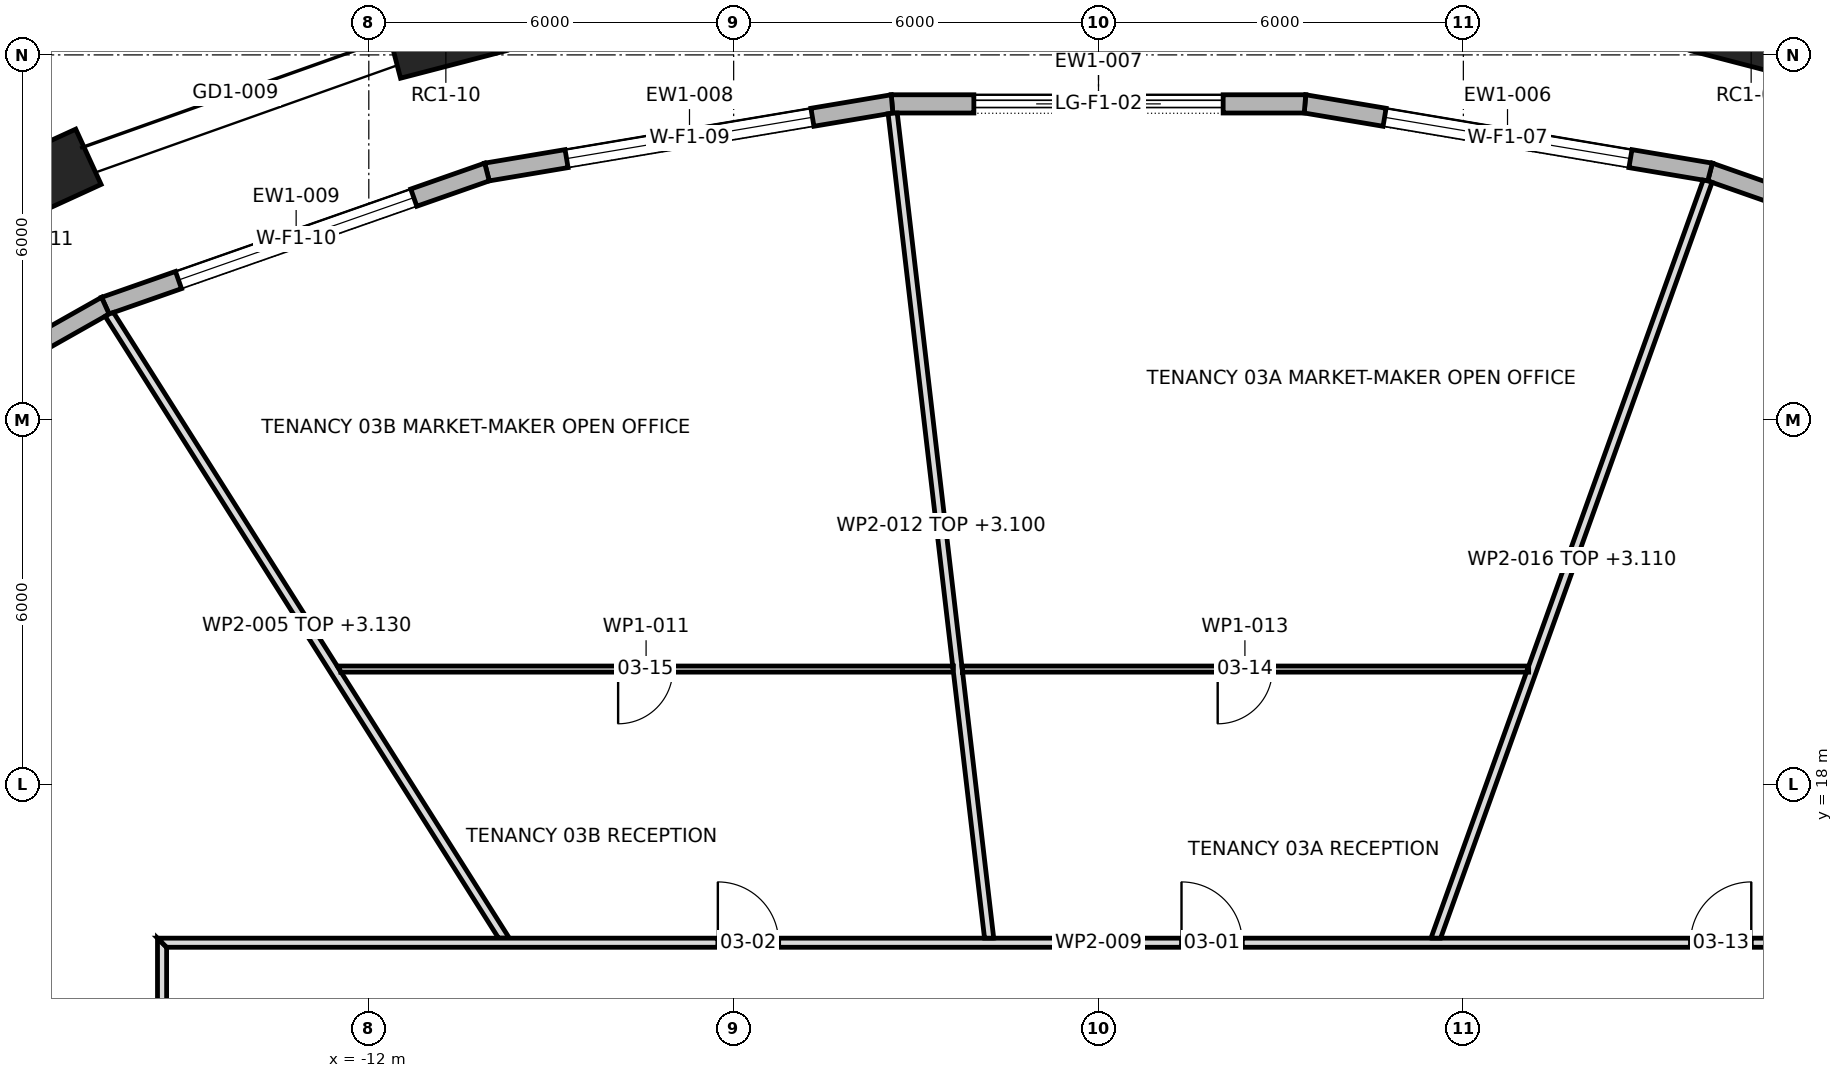
"""IFC4 building model, lengths in metres.
Left out: names, types, materials, properties, quantities, classifications, styles, units other than length and angle.
Written with IfcOpenShell. Run it as: python <this file> out.ifc"""

import sys

from ifc_helpers import new_model, si_unit, direction, frame, frame_2d, origin, origin_2d, place, context, subcontext, project, spatial, polyline, rectangle, outline, extrude, element, fill, save


model = new_model("IFC4")
c1 = context("Model", 3, precision=1e-05, world=origin(), true_north=direction((0.0, 1.0)))
c2 = subcontext(c1, "Body", "Model", "MODEL_VIEW")
j1 = project(units=[si_unit("LENGTHUNIT", "METRE"), si_unit("PLANEANGLEUNIT", "RADIAN")], contexts=[c1])
p1 = place(None, origin())
s1 = spatial("IfcSite", under=j1, at=p1, CompositionType="ELEMENT")
p2 = place(p1, origin())
s2 = spatial("IfcBuilding", under=s1, at=p2, CompositionType="ELEMENT")
p3 = place(p2, frame((0.0, 0.0, 57.1)))
s3 = spatial("IfcBuildingStorey", under=s2, at=p3, CompositionType="ELEMENT", Elevation=57.1)
for number, where, z_axis, x_axis in (
    (1, (10.733, 30.327, 0.0), (0.0, 0.0, 1.0), (-0.968, 0.252, 0.0)),
    (2, (-10.733, 30.327, 0.0), (0.0, 0.0, 1.0), (-0.968, -0.252, 0.0)),
    (3, (-17.429, 27.95, 0.0), (0.0, 0.0, 1.0), (-0.909, -0.417, 0.0)),
):
    element("IfcColumn", number, at=place(p3, frame(where, z_axis=z_axis, x_axis=x_axis)), inside=s3, PredefinedType="COLUMN", context=c2, shape_type="SweptSolid", body=[
        extrude(rectangle(XDim=1.8, YDim=1.0, at=origin_2d()), origin(), (0.0, 0.0, 1.0), 4.2),
    ])
p4 = place(p3, frame((16.333, 25.876, 0.0), z_axis=(0.0, 0.0, 1.0), x_axis=(-0.943790794479, 0.330543395421, 0.0)))
e4 = element("IfcWall", 4, at=p4, inside=s3, PredefinedType="STANDARD", context=c2, shape_type="SweptSolid", body=[
    extrude(outline(polyline([(-0.013, -0.15), (6.662, -0.15), (6.637, 0.15), (0.013, 0.15), (-0.013, -0.15)])), origin(), (0.0, 0.0, 1.0), 3.9),
])
p5 = place(p4, frame((1.275, 0.0, 0.6)))
e5 = element("IfcOpeningElement", 5, at=p5, cuts=e4, PredefinedType="OPENING", context=c2, shape_type="SweptSolid", body=[
    extrude(rectangle(XDim=4.1, YDim=2.85, at=frame_2d((2.05, 1.425))), frame((0.0, 0.162, 0.0), z_axis=(0.0, -1.0, 0.0), x_axis=(1.0, 0.0, 0.0)), (0.0, 0.0, 1.0), 0.324),
])
p6 = place(p3, frame((10.057, 28.074, 0.0), z_axis=(0.0, 0.0, 1.0), x_axis=(-0.986149614624, 0.165858185139, 0.0)))
e6 = element("IfcWall", 6, at=p6, inside=s3, PredefinedType="STANDARD", context=c2, shape_type="SweptSolid", body=[
    extrude(outline(polyline([(-0.013, -0.15), (6.767, -0.15), (6.742, 0.15), (0.013, 0.15), (-0.013, -0.15)])), origin(), (0.0, 0.0, 1.0), 3.9),
])
p7 = place(p6, frame((1.327, 0.0, 0.6)))
e7 = element("IfcOpeningElement", 7, at=p7, cuts=e6, PredefinedType="OPENING", context=c2, shape_type="SweptSolid", body=[
    extrude(rectangle(XDim=4.1, YDim=2.85, at=frame_2d((2.05, 1.425))), frame((0.0, 0.162, 0.0), z_axis=(0.0, -1.0, 0.0), x_axis=(1.0, 0.0, 0.0)), (0.0, 0.0, 1.0), 0.324),
])
p8 = place(p3, frame((3.396, 29.195, 0.0), z_axis=(0.0, 0.0, 1.0), x_axis=(-1.0, 0.0, 0.0)))
e8 = element("IfcWall", 8, at=p8, inside=s3, PredefinedType="STANDARD", context=c2, shape_type="SweptSolid", body=[
    extrude(outline(polyline([(-0.012, -0.15), (6.803, -0.15), (6.779, 0.15), (0.012, 0.15), (-0.012, -0.15)])), origin(), (0.0, 0.0, 1.0), 3.9),
])
p9 = place(p8, frame((1.346, 0.0, 0.0)))
e9 = element("IfcOpeningElement", 9, at=p9, cuts=e8, PredefinedType="OPENING", context=c2, shape_type="SweptSolid", body=[
    extrude(rectangle(XDim=4.1, YDim=3.45, at=frame_2d((2.05, 1.725))), frame((0.0, 0.162, 0.0), z_axis=(0.0, -1.0, 0.0), x_axis=(1.0, 0.0, 0.0)), (0.0, 0.0, 1.0), 0.324),
])
p10 = place(p3, frame((-3.396, 29.195, 0.0), z_axis=(0.0, 0.0, 1.0), x_axis=(-0.986149614624, -0.165858185139, 0.0)))
e10 = element("IfcWall", 10, at=p10, inside=s3, PredefinedType="STANDARD", context=c2, shape_type="SweptSolid", body=[
    extrude(outline(polyline([(-0.012, -0.15), (6.768, -0.15), (6.742, 0.15), (0.012, 0.15), (-0.012, -0.15)])), origin(), (0.0, 0.0, 1.0), 3.9),
])
p11 = place(p10, frame((1.327, 0.0, 0.6)))
e11 = element("IfcOpeningElement", 11, at=p11, cuts=e10, PredefinedType="OPENING", context=c2, shape_type="SweptSolid", body=[
    extrude(rectangle(XDim=4.1, YDim=2.85, at=frame_2d((2.05, 1.425))), frame((0.0, 0.162, 0.0), z_axis=(0.0, -1.0, 0.0), x_axis=(1.0, 0.0, 0.0)), (0.0, 0.0, 1.0), 0.324),
])
p12 = place(p3, frame((-10.057, 28.074, 0.0), z_axis=(0.0, 0.0, 1.0), x_axis=(-0.943790794479, -0.330543395421, 0.0)))
e12 = element("IfcWall", 12, at=p12, inside=s3, PredefinedType="STANDARD", context=c2, shape_type="SweptSolid", body=[
    extrude(outline(polyline([(-0.013, -0.15), (6.663, -0.15), (6.636, 0.15), (0.013, 0.15), (-0.013, -0.15)])), origin(), (0.0, 0.0, 1.0), 3.9),
])
p13 = place(p12, frame((1.275, 0.0, 0.6)))
e13 = element("IfcOpeningElement", 13, at=p13, cuts=e12, PredefinedType="OPENING", context=c2, shape_type="SweptSolid", body=[
    extrude(rectangle(XDim=4.1, YDim=2.85, at=frame_2d((2.05, 1.425))), frame((0.0, 0.162, 0.0), z_axis=(0.0, -1.0, 0.0), x_axis=(1.0, 0.0, 0.0)), (0.0, 0.0, 1.0), 0.324),
])
p14 = place(p3, frame((-16.333, 25.876, 0.0), z_axis=(0.0, 0.0, 1.0), x_axis=(-0.870647609977, -0.491907246584, 0.0)))
e14 = element("IfcWall", 14, at=p14, inside=s3, PredefinedType="STANDARD", context=c2, shape_type="SweptSolid", body=[
    extrude(outline(polyline([(-0.013, -0.15), (6.503, -0.15), (6.475, 0.15), (0.013, 0.15), (-0.013, -0.15)])), origin(), (0.0, 0.0, 1.0), 3.9),
])
p15 = place(p14, frame((1.195, 0.0, 0.6)))
e15 = element("IfcOpeningElement", 15, at=p15, cuts=e14, PredefinedType="OPENING", context=c2, shape_type="SweptSolid", body=[
    extrude(rectangle(XDim=4.1, YDim=2.85, at=frame_2d((2.05, 1.425))), frame((0.0, 0.162, 0.0), z_axis=(0.0, -1.0, 0.0), x_axis=(1.0, 0.0, 0.0)), (0.0, 0.0, 1.0), 0.324),
])
p16 = place(p3, frame((-16.273, 25.742, 0.0), z_axis=(0.0, 0.0, 1.0), x_axis=(0.534654841392, -0.845070529942, 0.0)))
e16 = element("IfcWall", 16, at=p16, inside=s3, PredefinedType="PARTITIONING", context=c2, shape_type="SweptSolid", body=[
    extrude(outline(polyline([(0.0, -0.075), (1.729, -0.075), (3.458, -0.075), (5.186, -0.075), (6.915, -0.075), (8.644, -0.075), (10.373, -0.075), (12.102, -0.075), (12.196, 0.075), (12.196, 0.075), (10.471, 0.075), (8.745, 0.075), (7.019, 0.075), (7.018, 0.072), (7.013, 0.075), (5.265, 0.075), (3.517, 0.075), (1.769, 0.075), (0.021, 0.075), (0.004, 0.0), (0.0, -0.071), (0.0, -0.075)])), origin(), (0.0, 0.0, 1.0), 3.13),
])
p17 = place(p3, frame((-15.4, -15.475, 0.0), z_axis=(0.0, 0.0, 1.0), x_axis=(0.0, 1.0, 0.0)))
e17 = element("IfcWall", 17, at=p17, inside=s3, PredefinedType="PARTITIONING", context=c2, shape_type="SweptSolid", body=[
    extrude(outline(polyline([(0.15, -0.075), (2.066, -0.075), (3.981, -0.075), (5.897, -0.075), (7.812, -0.075), (9.728, -0.075), (11.644, -0.075), (13.56, -0.075), (15.475, -0.075), (17.391, -0.075), (19.306, -0.075), (21.222, -0.075), (23.138, -0.075), (25.053, -0.075), (26.969, -0.075), (28.885, -0.075), (30.8, -0.075), (30.95, 0.075), (29.016, 0.075), (27.081, 0.075), (25.147, 0.075), (23.212, 0.075), (21.278, 0.075), (19.344, 0.075), (17.409, 0.075), (15.475, 0.075), (13.541, 0.075), (11.606, 0.075), (9.672, 0.075), (7.738, 0.075), (5.803, 0.075), (3.869, 0.075), (1.935, 0.075), (0.0, 0.075), (0.15, -0.075)])), origin(), (0.0, 0.0, 1.0), 3.9),
])
p18 = place(p17, frame((25.755, 0.0, 0.0)))
e18 = element("IfcOpeningElement", 18, at=p18, cuts=e17, PredefinedType="OPENING", context=c2, shape_type="SweptSolid", body=[
    extrude(rectangle(XDim=1.8, YDim=2.1, at=frame_2d((0.9, 1.05))), frame((0.0, 0.087, 0.0), z_axis=(0.0, -1.0, 0.0), x_axis=(1.0, 0.0, 0.0)), (0.0, 0.0, 1.0), 0.174),
])
p19 = place(p17, frame((18.695, 0.0, 0.0)))
e19 = element("IfcOpeningElement", 19, at=p19, cuts=e17, PredefinedType="OPENING", context=c2, shape_type="SweptSolid", body=[
    extrude(rectangle(XDim=1.8, YDim=2.1, at=frame_2d((0.9, 1.05))), frame((0.0, 0.087, 0.0), z_axis=(0.0, -1.0, 0.0), x_axis=(1.0, 0.0, 0.0)), (0.0, 0.0, 1.0), 0.174),
])
p20 = place(p17, frame((12.135, 0.0, 0.0)))
e20 = element("IfcOpeningElement", 20, at=p20, cuts=e17, PredefinedType="OPENING", context=c2, shape_type="SweptSolid", body=[
    extrude(rectangle(XDim=1.0, YDim=2.1, at=frame_2d((0.5, 1.05))), frame((0.0, 0.087, 0.0), z_axis=(0.0, -1.0, 0.0), x_axis=(1.0, 0.0, 0.0)), (0.0, 0.0, 1.0), 0.174),
])
p21 = place(p17, frame((3.395, 0.0, 0.0)))
e21 = element("IfcOpeningElement", 21, at=p21, cuts=e17, PredefinedType="OPENING", context=c2, shape_type="SweptSolid", body=[
    extrude(rectangle(XDim=1.8, YDim=2.1, at=frame_2d((0.9, 1.05))), frame((0.0, 0.087, 0.0), z_axis=(0.0, -1.0, 0.0), x_axis=(1.0, 0.0, 0.0)), (0.0, 0.0, 1.0), 0.174),
])
p22 = place(p3, frame((-15.475, 15.4, 0.0), z_axis=(0.0, 0.0, 1.0), x_axis=(1.0, 0.0, 0.0)))
e22 = element("IfcWall", 22, at=p22, inside=s3, PredefinedType="PARTITIONING", context=c2, shape_type="SweptSolid", body=[
    extrude(outline(polyline([(0.15, -0.075), (2.066, -0.075), (3.981, -0.075), (5.897, -0.075), (7.812, -0.075), (9.728, -0.075), (11.644, -0.075), (13.56, -0.075), (15.475, -0.075), (17.391, -0.075), (19.306, -0.075), (21.222, -0.075), (23.138, -0.075), (25.053, -0.075), (26.969, -0.075), (28.885, -0.075), (30.8, -0.075), (30.95, 0.075), (29.016, 0.075), (27.081, 0.075), (25.147, 0.075), (23.212, 0.075), (21.278, 0.075), (19.344, 0.075), (17.409, 0.075), (15.475, 0.075), (13.541, 0.075), (11.606, 0.075), (9.672, 0.075), (7.738, 0.075), (5.803, 0.075), (3.869, 0.075), (1.935, 0.075), (0.0, 0.075), (0.15, -0.075)])), origin(), (0.0, 0.0, 1.0), 3.9),
])
p23 = place(p22, frame((16.84, 0.0, 0.0)))
e23 = element("IfcOpeningElement", 23, at=p23, cuts=e22, PredefinedType="OPENING", context=c2, shape_type="SweptSolid", body=[
    extrude(rectangle(XDim=1.0, YDim=2.1, at=frame_2d((0.5, 1.05))), frame((0.0, 0.087, 0.0), z_axis=(0.0, -1.0, 0.0), x_axis=(1.0, 0.0, 0.0)), (0.0, 0.0, 1.0), 0.174),
])
p24 = place(p22, frame((9.215, 0.0, 0.0)))
e24 = element("IfcOpeningElement", 24, at=p24, cuts=e22, PredefinedType="OPENING", context=c2, shape_type="SweptSolid", body=[
    extrude(rectangle(XDim=1.0, YDim=2.1, at=frame_2d((0.5, 1.05))), frame((0.0, 0.087, 0.0), z_axis=(0.0, -1.0, 0.0), x_axis=(1.0, 0.0, 0.0)), (0.0, 0.0, 1.0), 0.174),
])
p25 = place(p22, frame((25.21, 0.0, 0.0)))
e25 = element("IfcOpeningElement", 25, at=p25, cuts=e22, PredefinedType="OPENING", context=c2, shape_type="SweptSolid", body=[
    extrude(rectangle(XDim=1.0, YDim=2.1, at=frame_2d((0.5, 1.05))), frame((0.0, 0.087, 0.0), z_axis=(0.0, -1.0, 0.0), x_axis=(1.0, 0.0, 0.0)), (0.0, 0.0, 1.0), 0.174),
])
p26 = place(p3, frame((-12.52, 19.9, 0.0), z_axis=(0.0, 0.0, 1.0), x_axis=(1.0, 0.0, 0.0)))
e26 = element("IfcWall", 26, at=p26, inside=s3, PredefinedType="PARTITIONING", context=c2, shape_type="SweptSolid", body=[
    extrude(outline(polyline([(10.134, -0.05), (10.134, -0.049), (10.122, 0.05), (8.435, 0.05), (6.748, 0.05), (5.061, 0.05), (3.374, 0.05), (1.687, 0.05), (0.0, 0.05), (0.0, 0.05), (0.063, -0.05), (1.741, -0.05), (3.42, -0.05), (5.098, -0.05), (6.777, -0.05), (8.455, -0.05), (10.134, -0.05)])), origin(), (0.0, 0.0, 1.0), 3.9),
])
p27 = place(p26, frame((4.619, 0.0, 0.0)))
e27 = element("IfcOpeningElement", 27, at=p27, cuts=e26, PredefinedType="OPENING", context=c2, shape_type="SweptSolid", body=[
    extrude(rectangle(XDim=0.9, YDim=2.1, at=frame_2d((0.45, 1.05))), frame((0.0, 0.062, 0.0), z_axis=(0.0, -1.0, 0.0), x_axis=(1.0, 0.0, 0.0)), (0.0, 0.0, 1.0), 0.124),
])
p28 = place(p3, frame((-3.385, 29.04, 0.0), z_axis=(0.0, 0.0, 1.0), x_axis=(0.116139488934, -0.993232912821, 0.0)))
e28 = element("IfcWall", 28, at=p28, inside=s3, PredefinedType="PARTITIONING", context=c2, shape_type="SweptSolid", body=[
    extrude(outline(polyline([(0.0, -0.075), (1.829, -0.075), (3.657, -0.075), (5.486, -0.075), (7.314, -0.075), (9.143, -0.075), (9.145, -0.063), (9.243, -0.075), (10.711, -0.075), (12.18, -0.075), (13.649, -0.075), (13.666, 0.073), (13.666, 0.075), (12.198, 0.075), (10.73, 0.075), (9.261, 0.075), (9.261, 0.075), (9.261, 0.075), (7.41, 0.075), (5.558, 0.075), (3.707, 0.075), (1.856, 0.075), (0.004, 0.075), (0.0, 0.038), (0.0, -0.075)])), origin(), (0.0, 0.0, 1.0), 3.1),
])
p29 = place(p3, frame((-2.247, 19.9, 0.0), z_axis=(0.0, 0.0, 1.0), x_axis=(1.0, 0.0, 0.0)))
e29 = element("IfcWall", 29, at=p29, inside=s3, PredefinedType="PARTITIONING", context=c2, shape_type="SweptSolid", body=[
    extrude(outline(polyline([(0.012, -0.05), (1.866, -0.05), (3.721, -0.05), (5.576, -0.05), (7.43, -0.05), (9.285, -0.05), (9.321, 0.049), (9.321, 0.05), (7.457, 0.05), (5.592, 0.05), (3.728, 0.05), (1.864, 0.05), (0.0, 0.05), (0.012, -0.05)])), origin(), (0.0, 0.0, 1.0), 3.9),
])
p30 = place(p29, frame((4.207, 0.0, 0.0)))
e30 = element("IfcOpeningElement", 30, at=p30, cuts=e29, PredefinedType="OPENING", context=c2, shape_type="SweptSolid", body=[
    extrude(rectangle(XDim=0.9, YDim=2.1, at=frame_2d((0.45, 1.05))), frame((0.0, 0.062, 0.0), z_axis=(0.0, -1.0, 0.0), x_axis=(1.0, 0.0, 0.0)), (0.0, 0.0, 1.0), 0.124),
])
p31 = place(p3, frame((5.538, 15.45, 0.0), z_axis=(0.0, 0.0, 1.0), x_axis=(0.337991057854, 0.941149321208, 0.0)))
e31 = element("IfcWall", 31, at=p31, inside=s3, PredefinedType="PARTITIONING", context=c2, shape_type="SweptSolid", body=[
    extrude(outline(polyline([(13.259, -0.075), (13.259, -0.041), (13.259, -0.0), (13.245, 0.075), (11.547, 0.075), (9.849, 0.075), (8.15, 0.075), (6.452, 0.075), (4.754, 0.075), (4.66, 0.042), (4.648, 0.075), (3.099, 0.075), (1.549, 0.075), (0.0, 0.075), (0.0, 0.074), (0.053, -0.075), (1.94, -0.075), (3.826, -0.075), (5.713, -0.075), (7.6, -0.075), (9.486, -0.075), (11.373, -0.075), (13.259, -0.075)])), origin(), (0.0, 0.0, 1.0), 3.11),
])
p32 = place(p7, origin())
e32 = element("IfcWindow", 32, at=p32, inside=s3, PartitioningType="TRIPLE_PANEL_VERTICAL", PredefinedType="WINDOW", context=c2, shape_type="SweptSolid", body=[
    extrude(rectangle(XDim=4.1, YDim=2.85, at=frame_2d((2.05, 1.425))), frame((0.0, 0.03, 0.0), z_axis=(0.0, -1.0, 0.0), x_axis=(1.0, 0.0, 0.0)), (0.0, 0.0, 1.0), 0.06),
])
fill(e7, e32)
p33 = place(p9, origin())
e33 = element("IfcDoor", 33, at=p33, inside=s3, OperationType="DOUBLE_DOOR_SLIDING", PredefinedType="DOOR", context=c2, shape_type="SweptSolid", body=[
    extrude(rectangle(XDim=4.1, YDim=3.45, at=frame_2d((2.05, 1.725))), frame((0.0, 0.025, 0.0), z_axis=(0.0, -1.0, 0.0), x_axis=(1.0, 0.0, 0.0)), (0.0, 0.0, 1.0), 0.05),
])
fill(e9, e33)
p34 = place(p11, origin())
e34 = element("IfcWindow", 34, at=p34, inside=s3, PartitioningType="TRIPLE_PANEL_VERTICAL", PredefinedType="WINDOW", context=c2, shape_type="SweptSolid", body=[
    extrude(rectangle(XDim=4.1, YDim=2.85, at=frame_2d((2.05, 1.425))), frame((0.0, 0.03, 0.0), z_axis=(0.0, -1.0, 0.0), x_axis=(1.0, 0.0, 0.0)), (0.0, 0.0, 1.0), 0.06),
])
fill(e11, e34)
p35 = place(p13, origin())
e35 = element("IfcWindow", 35, at=p35, inside=s3, PartitioningType="TRIPLE_PANEL_VERTICAL", PredefinedType="WINDOW", context=c2, shape_type="SweptSolid", body=[
    extrude(rectangle(XDim=4.1, YDim=2.85, at=frame_2d((2.05, 1.425))), frame((0.0, 0.03, 0.0), z_axis=(0.0, -1.0, 0.0), x_axis=(1.0, 0.0, 0.0)), (0.0, 0.0, 1.0), 0.06),
])
fill(e13, e35)
p36 = place(p23, origin())
e36 = element("IfcDoor", 36, at=p36, inside=s3, OperationType="SINGLE_SWING_RIGHT", PredefinedType="DOOR", context=c2, shape_type="SweptSolid", body=[
    extrude(rectangle(XDim=1.0, YDim=2.1, at=frame_2d((0.5, 1.05))), frame((0.0, 0.025, 0.0), z_axis=(0.0, -1.0, 0.0), x_axis=(1.0, 0.0, 0.0)), (0.0, 0.0, 1.0), 0.05),
])
fill(e23, e36)
p37 = place(p24, origin())
e37 = element("IfcDoor", 37, at=p37, inside=s3, OperationType="SINGLE_SWING_RIGHT", PredefinedType="DOOR", context=c2, shape_type="SweptSolid", body=[
    extrude(rectangle(XDim=1.0, YDim=2.1, at=frame_2d((0.5, 1.05))), frame((0.0, 0.025, 0.0), z_axis=(0.0, -1.0, 0.0), x_axis=(1.0, 0.0, 0.0)), (0.0, 0.0, 1.0), 0.05),
])
fill(e24, e37)
p38 = place(p25, origin())
e38 = element("IfcDoor", 38, at=p38, inside=s3, OperationType="SINGLE_SWING_LEFT", PredefinedType="DOOR", context=c2, shape_type="SweptSolid", body=[
    extrude(rectangle(XDim=1.0, YDim=2.1, at=frame_2d((0.5, 1.05))), frame((0.0, 0.025, 0.0), z_axis=(0.0, -1.0, 0.0), x_axis=(1.0, 0.0, 0.0)), (0.0, 0.0, 1.0), 0.05),
])
fill(e25, e38)
p39 = place(p30, frame((0.9, 0.0, 0.0), z_axis=(0.0, 0.0, 1.0), x_axis=(-1.0, 0.0, 0.0)))
e39 = element("IfcDoor", 39, at=p39, inside=s3, OperationType="SINGLE_SWING_LEFT", PredefinedType="DOOR", context=c2, shape_type="SweptSolid", body=[
    extrude(rectangle(XDim=0.9, YDim=2.1, at=frame_2d((0.45, 1.05))), frame((0.0, 0.025, 0.0), z_axis=(0.0, -1.0, 0.0), x_axis=(1.0, 0.0, 0.0)), (0.0, 0.0, 1.0), 0.05),
])
fill(e30, e39)
p40 = place(p27, frame((0.9, 0.0, 0.0), z_axis=(0.0, 0.0, 1.0), x_axis=(-1.0, 0.0, 0.0)))
e40 = element("IfcDoor", 40, at=p40, inside=s3, OperationType="SINGLE_SWING_LEFT", PredefinedType="DOOR", context=c2, shape_type="SweptSolid", body=[
    extrude(rectangle(XDim=0.9, YDim=2.1, at=frame_2d((0.45, 1.05))), frame((0.0, 0.025, 0.0), z_axis=(0.0, -1.0, 0.0), x_axis=(1.0, 0.0, 0.0)), (0.0, 0.0, 1.0), 0.05),
])
fill(e27, e40)
save(model, sys.argv[1])
